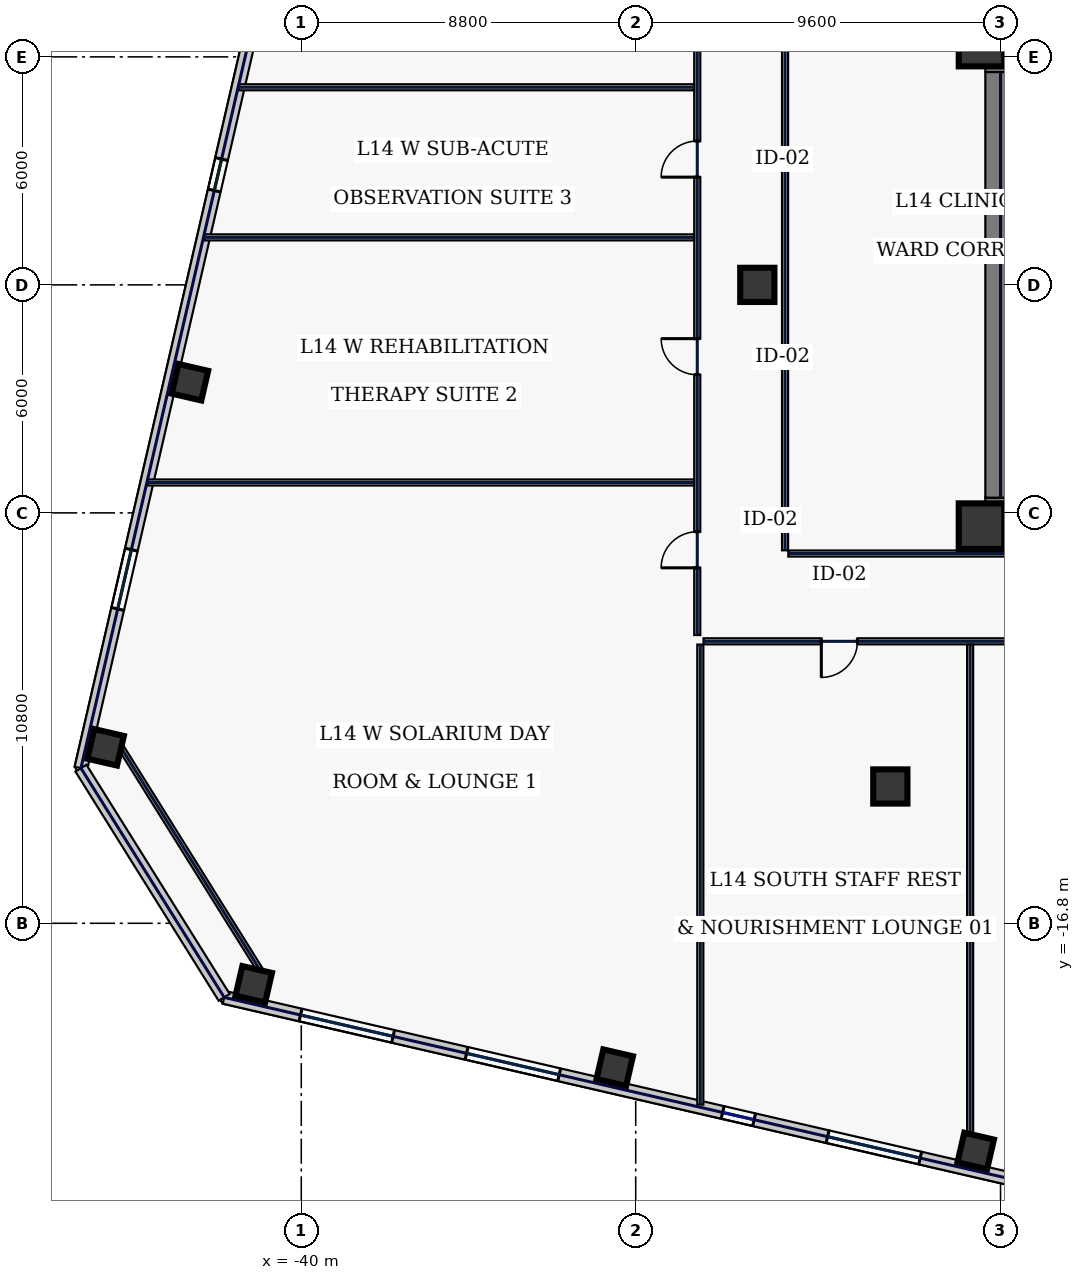
"""IFC4 building model, lengths in metres.
Left out: names, types, materials, properties, quantities, classifications, styles, units other than length and angle.
Written with IfcOpenShell. Run it as: python <this file> out.ifc"""

import sys

from ifc_helpers import new_model, si_unit, direction, frame, frame_2d, origin, origin_2d, place, context, subcontext, project, spatial, rectangle, hollow_rectangle, extrude, element, fill, save


model = new_model("IFC4")
c1 = context("Model", 3, precision=1e-05, world=origin(), true_north=direction((0.0, 1.0)))
c2 = subcontext(c1, "Body", "Model", "MODEL_VIEW")
j1 = project(units=[si_unit("LENGTHUNIT", "METRE"), si_unit("PLANEANGLEUNIT", "RADIAN")], contexts=[c1])
p1 = place(None, origin())
s1 = spatial("IfcSite", under=j1, at=p1, CompositionType="ELEMENT")
p2 = place(p1, origin())
s2 = spatial("IfcBuilding", under=s1, at=p2, CompositionType="ELEMENT")
p3 = place(p2, frame((0.0, 0.0, 67.4)))
s3 = spatial("IfcBuildingStorey", under=s2, at=p3, CompositionType="ELEMENT", Elevation=67.4)
for number, where, z_axis, x_axis in (
    (1, (-22.0, 6.0, 0.0), (0.0, 0.0, 1.0), (1.0, 0.0, 0.0)),
    (2, (-22.0, -6.0, 0.0), (0.0, 0.0, 1.0), (1.0, 0.0, 0.0)),
):
    element("IfcWall", number, at=place(p3, frame(where, z_axis=z_axis, x_axis=x_axis)), inside=s3, PredefinedType="SHEAR", context=c2, shape_type="SweptSolid", body=[
        extrude(rectangle(XDim=11.6, YDim=0.8, at=frame_2d((5.8, 0.0))), origin(), (0.0, 0.0, 1.0), 3.74),
    ])
p4 = place(p3, frame((-21.6, -5.6, 0.0), z_axis=(0.0, 0.0, 1.0), x_axis=(0.0, 1.0, 0.0)))
e3 = element("IfcWall", 3, at=p4, inside=s3, PredefinedType="SHEAR", context=c2, shape_type="SweptSolid", body=[
    extrude(rectangle(XDim=11.2, YDim=0.8, at=frame_2d((5.6, 0.0))), origin(), (0.0, 0.0, 1.0), 3.74),
])
for number, where, z_axis, x_axis in (
    (4, (-22.1, -6.35, 0.0), (0.0, 0.0, 1.0), (1.0, 0.0, 0.0)),
    (5, (-22.1, 6.35, 0.0), (0.0, 0.0, 1.0), (1.0, 0.0, 0.0)),
):
    element("IfcColumn", number, at=place(p3, frame(where, z_axis=z_axis, x_axis=x_axis)), inside=s3, PredefinedType="COLUMN", context=c2, shape_type="SweptSolid", body=[
        extrude(hollow_rectangle(XDim=1.2, YDim=1.2, WallThickness=0.05, at=origin_2d()), origin(), (0.0, 0.0, 1.0), 3.74),
    ])
for number, where, z_axis, x_axis in (
    (6, (-24.5, -13.2, 0.0), (0.0, 0.0, 1.0), (1.0, 0.0, 0.0)),
    (7, (-28.0, 0.0, 0.0), (0.0, 0.0, 1.0), (1.0, 0.0, 0.0)),
):
    element("IfcColumn", number, at=place(p3, frame(where, z_axis=z_axis, x_axis=x_axis)), inside=s3, PredefinedType="COLUMN", context=c2, shape_type="SweptSolid", body=[
        extrude(hollow_rectangle(XDim=0.9, YDim=0.9, WallThickness=0.04, at=origin_2d()), origin(), (0.0, 0.0, 1.0), 3.74),
    ])
for number, where, z_axis, x_axis in (
    (8, (-41.251, -18.406, 0.0), (0.0, 0.0, 1.0), (0.974, -0.225, 0.0)),
    (9, (-31.752, -20.599, 0.0), (0.0, 0.0, 1.0), (0.974, -0.225, 0.0)),
    (10, (-22.254, -22.792, 0.0), (0.0, 0.0, 1.0), (0.974, -0.225, 0.0)),
    (11, (-42.93, -2.562, 0.0), (0.0, 0.0, 1.0), (0.974, -0.225, 0.0)),
    (12, (-45.148, -12.169, 0.0), (0.0, 0.0, 1.0), (0.974, -0.225, 0.0)),
):
    element("IfcColumn", number, at=place(p3, frame(where, z_axis=z_axis, x_axis=x_axis)), inside=s3, PredefinedType="COLUMN", context=c2, shape_type="SweptSolid", body=[
        extrude(hollow_rectangle(XDim=0.8, YDim=0.8, WallThickness=0.036, at=origin_2d()), origin(), (0.0, 0.0, 1.0), 3.74),
    ])
p5 = place(p3, frame((-42.029, -18.75, 0.0), z_axis=(0.0, 0.0, 1.0), x_axis=(0.97436993772, -0.224951604723, 0.0)))
e13 = element("IfcWall", 13, at=p5, inside=s3, PredefinedType="STANDARD", context=c2, shape_type="SweptSolid", body=[
    extrude(rectangle(XDim=22.651, YDim=0.34, at=frame_2d((11.326, 0.0))), origin(), (0.0, 0.0, 1.0), 3.74),
])
p6 = place(p5, frame((2.062, 0.0, 0.72)))
e14 = element("IfcOpeningElement", 14, at=p6, cuts=e13, PredefinedType="OPENING", context=c2, shape_type="SweptSolid", body=[
    extrude(rectangle(XDim=2.5, YDim=2.15, at=frame_2d((1.25, 1.075))), frame((0.0, 0.18, 0.0), z_axis=(0.0, -1.0, 0.0), x_axis=(1.0, 0.0, 0.0)), (0.0, 0.0, 1.0), 0.36),
])
p7 = place(p5, frame((6.546, 0.0, 0.72)))
e15 = element("IfcOpeningElement", 15, at=p7, cuts=e13, PredefinedType="OPENING", context=c2, shape_type="SweptSolid", body=[
    extrude(rectangle(XDim=2.5, YDim=2.15, at=frame_2d((1.25, 1.075))), frame((0.0, 0.18, 0.0), z_axis=(0.0, -1.0, 0.0), x_axis=(1.0, 0.0, 0.0)), (0.0, 0.0, 1.0), 0.36),
])
p8 = place(p5, frame((13.461, 0.0, 0.72)))
e16 = element("IfcOpeningElement", 16, at=p8, cuts=e13, PredefinedType="OPENING", context=c2, shape_type="SweptSolid", body=[
    extrude(rectangle(XDim=0.85, YDim=1.85, at=frame_2d((0.425, 0.925))), frame((0.0, 0.18, 0.0), z_axis=(0.0, -1.0, 0.0), x_axis=(1.0, 0.0, 0.0)), (0.0, 0.0, 1.0), 0.36),
])
p9 = place(p5, frame((16.295, 0.0, 0.72)))
e17 = element("IfcOpeningElement", 17, at=p9, cuts=e13, PredefinedType="OPENING", context=c2, shape_type="SweptSolid", body=[
    extrude(rectangle(XDim=2.5, YDim=2.15, at=frame_2d((1.25, 1.075))), frame((0.0, 0.18, 0.0), z_axis=(0.0, -1.0, 0.0), x_axis=(1.0, 0.0, 0.0)), (0.0, 0.0, 1.0), 0.36),
])
p10 = place(p3, frame((-36.62, 27.037, 0.0), z_axis=(0.0, 0.0, 1.0), x_axis=(-0.224951280646, -0.974370012539, 0.0)))
e18 = element("IfcWall", 18, at=p10, inside=s3, PredefinedType="STANDARD", context=c2, shape_type="SweptSolid", body=[
    extrude(rectangle(XDim=40.8, YDim=0.34, at=frame_2d((20.4, 0.0))), origin(), (0.0, 0.0, 1.0), 3.74),
])
p11 = place(p10, frame((4.3, 0.0, 0.58)))
e19 = element("IfcOpeningElement", 19, at=p11, cuts=e18, PredefinedType="OPENING", context=c2, shape_type="SweptSolid", body=[
    extrude(rectangle(XDim=1.6, YDim=2.3, at=frame_2d((0.8, 1.15))), frame((0.0, 0.18, 0.0), z_axis=(0.0, -1.0, 0.0), x_axis=(1.0, 0.0, 0.0)), (0.0, 0.0, 1.0), 0.36),
])
p12 = place(p10, frame((14.5, 0.0, 0.58)))
e20 = element("IfcOpeningElement", 20, at=p12, cuts=e18, PredefinedType="OPENING", context=c2, shape_type="SweptSolid", body=[
    extrude(rectangle(XDim=1.6, YDim=2.3, at=frame_2d((0.8, 1.15))), frame((0.0, 0.18, 0.0), z_axis=(0.0, -1.0, 0.0), x_axis=(1.0, 0.0, 0.0)), (0.0, 0.0, 1.0), 0.36),
])
p13 = place(p10, frame((24.35, 0.0, 0.75)))
e21 = element("IfcOpeningElement", 21, at=p13, cuts=e18, PredefinedType="OPENING", context=c2, shape_type="SweptSolid", body=[
    extrude(rectangle(XDim=0.85, YDim=1.85, at=frame_2d((0.425, 0.925))), frame((0.0, 0.18, 0.0), z_axis=(0.0, -1.0, 0.0), x_axis=(1.0, 0.0, 0.0)), (0.0, 0.0, 1.0), 0.36),
])
p14 = place(p10, frame((34.9, 0.0, 0.58)))
e22 = element("IfcOpeningElement", 22, at=p14, cuts=e18, PredefinedType="OPENING", context=c2, shape_type="SweptSolid", body=[
    extrude(rectangle(XDim=1.6, YDim=2.3, at=frame_2d((0.8, 1.15))), frame((0.0, 0.18, 0.0), z_axis=(0.0, -1.0, 0.0), x_axis=(1.0, 0.0, 0.0)), (0.0, 0.0, 1.0), 0.36),
])
p15 = place(p3, frame((-45.798, -12.717, 0.0), z_axis=(0.0, 0.0, 1.0), x_axis=(0.529906387556, -0.848056142261, 0.0)))
e23 = element("IfcWall", 23, at=p15, inside=s3, PredefinedType="STANDARD", context=c2, shape_type="SweptSolid", body=[
    extrude(rectangle(XDim=7.114, YDim=0.34, at=frame_2d((3.557, 0.0))), origin(), (0.0, 0.0, 1.0), 3.74),
])
p16 = place(p3, frame((-44.86, -11.989, 0.0), z_axis=(0.0, 0.0, 1.0), x_axis=(0.52991239767, -0.848052386823, 0.0)))
e24 = element("IfcWall", 24, at=p16, inside=s3, PredefinedType="PARTITIONING", context=c2, shape_type="SweptSolid", body=[
    extrude(rectangle(XDim=7.354, YDim=0.16, at=frame_2d((3.677, 0.0))), origin(), (0.0, 0.0, 1.0), 3.74),
])
p17 = place(p3, frame((-29.58, -9.215, 0.0), z_axis=(0.0, 0.0, 1.0), x_axis=(0.0, 1.0, 0.0)))
e25 = element("IfcWall", 25, at=p17, inside=s3, PredefinedType="PARTITIONING", context=c2, shape_type="SweptSolid", body=[
    extrude(rectangle(XDim=18.63, YDim=0.16, at=frame_2d((9.315, 0.0))), origin(), (0.0, 0.0, 1.0), 3.74),
])
p18 = place(p17, frame((1.769, 0.0, 0.0)))
e26 = element("IfcOpeningElement", 26, at=p18, cuts=e25, PredefinedType="OPENING", context=c2, shape_type="SweptSolid", body=[
    extrude(rectangle(XDim=0.95, YDim=2.2, at=frame_2d((0.475, 1.1))), frame((0.0, 0.09, 0.0), z_axis=(0.0, -1.0, 0.0), x_axis=(1.0, 0.0, 0.0)), (0.0, 0.0, 1.0), 0.18),
])
p19 = place(p17, frame((6.85, 0.0, 0.0)))
e27 = element("IfcOpeningElement", 27, at=p19, cuts=e25, PredefinedType="OPENING", context=c2, shape_type="SweptSolid", body=[
    extrude(rectangle(XDim=0.95, YDim=2.2, at=frame_2d((0.475, 1.1))), frame((0.0, 0.09, 0.0), z_axis=(0.0, -1.0, 0.0), x_axis=(1.0, 0.0, 0.0)), (0.0, 0.0, 1.0), 0.18),
])
p20 = place(p17, frame((12.05, 0.0, 0.0)))
e28 = element("IfcOpeningElement", 28, at=p20, cuts=e25, PredefinedType="OPENING", context=c2, shape_type="SweptSolid", body=[
    extrude(rectangle(XDim=0.95, YDim=2.2, at=frame_2d((0.475, 1.1))), frame((0.0, 0.09, 0.0), z_axis=(0.0, -1.0, 0.0), x_axis=(1.0, 0.0, 0.0)), (0.0, 0.0, 1.0), 0.18),
])
p21 = place(p17, frame((15.981, 0.0, 0.0)))
e29 = element("IfcOpeningElement", 29, at=p21, cuts=e25, PredefinedType="OPENING", context=c2, shape_type="SweptSolid", body=[
    extrude(rectangle(XDim=0.95, YDim=2.2, at=frame_2d((0.475, 1.1))), frame((0.0, 0.09, 0.0), z_axis=(0.0, -1.0, 0.0), x_axis=(1.0, 0.0, 0.0)), (0.0, 0.0, 1.0), 0.18),
])
p22 = place(p3, frame((29.415, -9.38, 0.0), z_axis=(0.0, 0.0, 1.0), x_axis=(-1.0, 0.0, 0.0)))
e30 = element("IfcWall", 30, at=p22, inside=s3, PredefinedType="PARTITIONING", context=c2, shape_type="SweptSolid", body=[
    extrude(rectangle(XDim=58.83, YDim=0.16, at=frame_2d((29.415, 0.0))), origin(), (0.0, 0.0, 1.0), 3.74),
])
p23 = place(p22, frame((54.781, 0.0, 0.0)))
e31 = element("IfcOpeningElement", 31, at=p23, cuts=e30, PredefinedType="OPENING", context=c2, shape_type="SweptSolid", body=[
    extrude(rectangle(XDim=0.95, YDim=2.2, at=frame_2d((0.475, 1.1))), frame((0.0, 0.09, 0.0), z_axis=(0.0, -1.0, 0.0), x_axis=(1.0, 0.0, 0.0)), (0.0, 0.0, 1.0), 0.18),
])
p24 = place(p22, frame((47.625, 0.0, 0.0)))
e32 = element("IfcOpeningElement", 32, at=p24, cuts=e30, PredefinedType="OPENING", context=c2, shape_type="SweptSolid", body=[
    extrude(rectangle(XDim=1.3, YDim=2.2, at=frame_2d((0.65, 1.1))), frame((0.0, 0.09, 0.0), z_axis=(0.0, -1.0, 0.0), x_axis=(1.0, 0.0, 0.0)), (0.0, 0.0, 1.0), 0.18),
])
p25 = place(p22, frame((40.825, 0.0, 0.0)))
e33 = element("IfcOpeningElement", 33, at=p25, cuts=e30, PredefinedType="OPENING", context=c2, shape_type="SweptSolid", body=[
    extrude(rectangle(XDim=1.45, YDim=2.2, at=frame_2d((0.725, 1.1))), frame((0.0, 0.09, 0.0), z_axis=(0.0, -1.0, 0.0), x_axis=(1.0, 0.0, 0.0)), (0.0, 0.0, 1.0), 0.18),
])
p26 = place(p22, frame((33.625, 0.0, 0.0)))
e34 = element("IfcOpeningElement", 34, at=p26, cuts=e30, PredefinedType="OPENING", context=c2, shape_type="SweptSolid", body=[
    extrude(rectangle(XDim=1.3, YDim=2.2, at=frame_2d((0.65, 1.1))), frame((0.0, 0.09, 0.0), z_axis=(0.0, -1.0, 0.0), x_axis=(1.0, 0.0, 0.0)), (0.0, 0.0, 1.0), 0.18),
])
p27 = place(p22, frame((26.2, 0.0, 0.0)))
e35 = element("IfcOpeningElement", 35, at=p27, cuts=e30, PredefinedType="OPENING", context=c2, shape_type="SweptSolid", body=[
    extrude(rectangle(XDim=0.95, YDim=2.2, at=frame_2d((0.475, 1.1))), frame((0.0, 0.09, 0.0), z_axis=(0.0, -1.0, 0.0), x_axis=(1.0, 0.0, 0.0)), (0.0, 0.0, 1.0), 0.18),
])
p28 = place(p22, frame((18.85, 0.0, 0.0)))
e36 = element("IfcOpeningElement", 36, at=p28, cuts=e30, PredefinedType="OPENING", context=c2, shape_type="SweptSolid", body=[
    extrude(rectangle(XDim=0.95, YDim=2.2, at=frame_2d((0.475, 1.1))), frame((0.0, 0.09, 0.0), z_axis=(0.0, -1.0, 0.0), x_axis=(1.0, 0.0, 0.0)), (0.0, 0.0, 1.0), 0.18),
])
p29 = place(p22, frame((11.75, 0.0, 0.0)))
e37 = element("IfcOpeningElement", 37, at=p29, cuts=e30, PredefinedType="OPENING", context=c2, shape_type="SweptSolid", body=[
    extrude(rectangle(XDim=1.05, YDim=2.2, at=frame_2d((0.525, 1.1))), frame((0.0, 0.09, 0.0), z_axis=(0.0, -1.0, 0.0), x_axis=(1.0, 0.0, 0.0)), (0.0, 0.0, 1.0), 0.18),
])
p30 = place(p22, frame((5.975, 0.0, 0.0)))
e38 = element("IfcOpeningElement", 38, at=p30, cuts=e30, PredefinedType="OPENING", context=c2, shape_type="SweptSolid", body=[
    extrude(rectangle(XDim=0.95, YDim=2.2, at=frame_2d((0.475, 1.1))), frame((0.0, 0.09, 0.0), z_axis=(0.0, -1.0, 0.0), x_axis=(1.0, 0.0, 0.0)), (0.0, 0.0, 1.0), 0.18),
])
p31 = place(p22, frame((1.719, 0.0, 0.0)))
e39 = element("IfcOpeningElement", 39, at=p31, cuts=e30, PredefinedType="OPENING", context=c2, shape_type="SweptSolid", body=[
    extrude(rectangle(XDim=1.15, YDim=2.2, at=frame_2d((0.575, 1.1))), frame((0.0, 0.09, 0.0), z_axis=(0.0, -1.0, 0.0), x_axis=(1.0, 0.0, 0.0)), (0.0, 0.0, 1.0), 0.18),
])
p32 = place(p3, frame((-27.27, 7.185, 0.0), z_axis=(0.0, 0.0, 1.0), x_axis=(0.0, -1.0, 0.0)))
e40 = element("IfcWall", 40, at=p32, inside=s3, PredefinedType="PARTITIONING", context=c2, shape_type="SweptSolid", body=[
    extrude(rectangle(XDim=14.17, YDim=0.16, at=frame_2d((7.085, 0.0))), origin(), (0.0, 0.0, 1.0), 3.74),
])
p33 = place(p3, frame((-27.185, -7.07, 0.0), z_axis=(0.0, 0.0, 1.0), x_axis=(1.0, 0.0, 0.0)))
e41 = element("IfcWall", 41, at=p33, inside=s3, PredefinedType="PARTITIONING", context=c2, shape_type="SweptSolid", body=[
    extrude(rectangle(XDim=16.52, YDim=0.16, at=frame_2d((8.26, 0.0))), origin(), (0.0, 0.0, 1.0), 3.74),
])
p34 = place(p3, frame((-29.5, -21.571, 0.0), z_axis=(0.0, 0.0, 1.0), x_axis=(0.0, 1.0, 0.0)))
e42 = element("IfcWall", 42, at=p34, inside=s3, PredefinedType="PARTITIONING", context=c2, shape_type="SweptSolid", body=[
    extrude(rectangle(XDim=12.105, YDim=0.16, at=frame_2d((6.053, 0.0))), origin(), (0.0, 0.0, 1.0), 3.74),
])
p35 = place(p3, frame((-22.4, -23.21, 0.0), z_axis=(0.0, 0.0, 1.0), x_axis=(0.0, 1.0, 0.0)))
e43 = element("IfcWall", 43, at=p35, inside=s3, PredefinedType="PARTITIONING", context=c2, shape_type="SweptSolid", body=[
    extrude(rectangle(XDim=13.745, YDim=0.16, at=frame_2d((6.872, 0.0))), origin(), (0.0, 0.0, 1.0), 3.235),
])
p36 = place(p3, frame((-44.042, -5.2, 0.0), z_axis=(0.0, 0.0, 1.0), x_axis=(1.0, 0.0, 0.0)))
e44 = element("IfcWall", 44, at=p36, inside=s3, PredefinedType="PARTITIONING", context=c2, shape_type="SweptSolid", body=[
    extrude(rectangle(XDim=14.377, YDim=0.16, at=frame_2d((7.188, 0.0))), origin(), (0.0, 0.0, 1.0), 3.74),
])
p37 = place(p3, frame((-42.553, 1.25, 0.0), z_axis=(0.0, 0.0, 1.0), x_axis=(1.0, 0.0, 0.0)))
e45 = element("IfcWall", 45, at=p37, inside=s3, PredefinedType="PARTITIONING", context=c2, shape_type="SweptSolid", body=[
    extrude(rectangle(XDim=12.888, YDim=0.16, at=frame_2d((6.444, 0.0))), origin(), (0.0, 0.0, 1.0), 3.74),
])
p38 = place(p3, frame((-41.641, 5.2, 0.0), z_axis=(0.0, 0.0, 1.0), x_axis=(1.0, 0.0, 0.0)))
e46 = element("IfcWall", 46, at=p38, inside=s3, PredefinedType="PARTITIONING", context=c2, shape_type="SweptSolid", body=[
    extrude(rectangle(XDim=11.976, YDim=0.16, at=frame_2d((5.988, 0.0))), origin(), (0.0, 0.0, 1.0), 3.74),
])
p39 = place(p6, origin())
e47 = element("IfcWindow", 47, at=p39, inside=s3, PartitioningType="SINGLE_PANEL", PredefinedType="WINDOW", context=c2, shape_type="SweptSolid", body=[
    extrude(rectangle(XDim=2.5, YDim=2.15, at=frame_2d((1.25, 1.075))), frame((0.0, 0.03, 0.0), z_axis=(0.0, -1.0, 0.0), x_axis=(1.0, 0.0, 0.0)), (0.0, 0.0, 1.0), 0.06),
])
fill(e14, e47)
p40 = place(p7, origin())
e48 = element("IfcWindow", 48, at=p40, inside=s3, PartitioningType="SINGLE_PANEL", PredefinedType="WINDOW", context=c2, shape_type="SweptSolid", body=[
    extrude(rectangle(XDim=2.5, YDim=2.15, at=frame_2d((1.25, 1.075))), frame((0.0, 0.03, 0.0), z_axis=(0.0, -1.0, 0.0), x_axis=(1.0, 0.0, 0.0)), (0.0, 0.0, 1.0), 0.06),
])
fill(e15, e48)
p41 = place(p8, origin())
e49 = element("IfcWindow", 49, at=p41, inside=s3, PartitioningType="SINGLE_PANEL", PredefinedType="WINDOW", context=c2, shape_type="SweptSolid", body=[
    extrude(rectangle(XDim=0.85, YDim=1.85, at=frame_2d((0.425, 0.925))), frame((0.0, 0.03, 0.0), z_axis=(0.0, -1.0, 0.0), x_axis=(1.0, 0.0, 0.0)), (0.0, 0.0, 1.0), 0.06),
])
fill(e16, e49)
p42 = place(p9, origin())
e50 = element("IfcWindow", 50, at=p42, inside=s3, PartitioningType="SINGLE_PANEL", PredefinedType="WINDOW", context=c2, shape_type="SweptSolid", body=[
    extrude(rectangle(XDim=2.5, YDim=2.15, at=frame_2d((1.25, 1.075))), frame((0.0, 0.03, 0.0), z_axis=(0.0, -1.0, 0.0), x_axis=(1.0, 0.0, 0.0)), (0.0, 0.0, 1.0), 0.06),
])
fill(e17, e50)
p43 = place(p13, origin())
e51 = element("IfcWindow", 51, at=p43, inside=s3, PartitioningType="SINGLE_PANEL", PredefinedType="WINDOW", context=c2, shape_type="SweptSolid", body=[
    extrude(rectangle(XDim=0.85, YDim=1.85, at=frame_2d((0.425, 0.925))), frame((0.0, 0.03, 0.0), z_axis=(0.0, -1.0, 0.0), x_axis=(1.0, 0.0, 0.0)), (0.0, 0.0, 1.0), 0.06),
])
fill(e21, e51)
p44 = place(p14, origin())
e52 = element("IfcWindow", 52, at=p44, inside=s3, PartitioningType="SINGLE_PANEL", PredefinedType="WINDOW", context=c2, shape_type="SweptSolid", body=[
    extrude(rectangle(XDim=1.6, YDim=2.3, at=frame_2d((0.8, 1.15))), frame((0.0, 0.03, 0.0), z_axis=(0.0, -1.0, 0.0), x_axis=(1.0, 0.0, 0.0)), (0.0, 0.0, 1.0), 0.06),
])
fill(e22, e52)
p45 = place(p23, origin())
e53 = element("IfcDoor", 53, at=p45, inside=s3, OperationType="SINGLE_SWING_RIGHT", PredefinedType="DOOR", context=c2, shape_type="SweptSolid", body=[
    extrude(rectangle(XDim=0.95, YDim=2.2, at=frame_2d((0.475, 1.1))), frame((0.0, 0.025, 0.0), z_axis=(0.0, -1.0, 0.0), x_axis=(1.0, 0.0, 0.0)), (0.0, 0.0, 1.0), 0.05),
])
fill(e31, e53)
p46 = place(p18, origin())
e54 = element("IfcDoor", 54, at=p46, inside=s3, OperationType="SINGLE_SWING_LEFT", PredefinedType="DOOR", context=c2, shape_type="SweptSolid", body=[
    extrude(rectangle(XDim=0.95, YDim=2.2, at=frame_2d((0.475, 1.1))), frame((0.0, 0.025, 0.0), z_axis=(0.0, -1.0, 0.0), x_axis=(1.0, 0.0, 0.0)), (0.0, 0.0, 1.0), 0.05),
])
fill(e26, e54)
p47 = place(p19, origin())
e55 = element("IfcDoor", 55, at=p47, inside=s3, OperationType="SINGLE_SWING_RIGHT", PredefinedType="DOOR", context=c2, shape_type="SweptSolid", body=[
    extrude(rectangle(XDim=0.95, YDim=2.2, at=frame_2d((0.475, 1.1))), frame((0.0, 0.025, 0.0), z_axis=(0.0, -1.0, 0.0), x_axis=(1.0, 0.0, 0.0)), (0.0, 0.0, 1.0), 0.05),
])
fill(e27, e55)
p48 = place(p20, origin())
e56 = element("IfcDoor", 56, at=p48, inside=s3, OperationType="SINGLE_SWING_LEFT", PredefinedType="DOOR", context=c2, shape_type="SweptSolid", body=[
    extrude(rectangle(XDim=0.95, YDim=2.2, at=frame_2d((0.475, 1.1))), frame((0.0, 0.025, 0.0), z_axis=(0.0, -1.0, 0.0), x_axis=(1.0, 0.0, 0.0)), (0.0, 0.0, 1.0), 0.05),
])
fill(e28, e56)
save(model, sys.argv[1])
